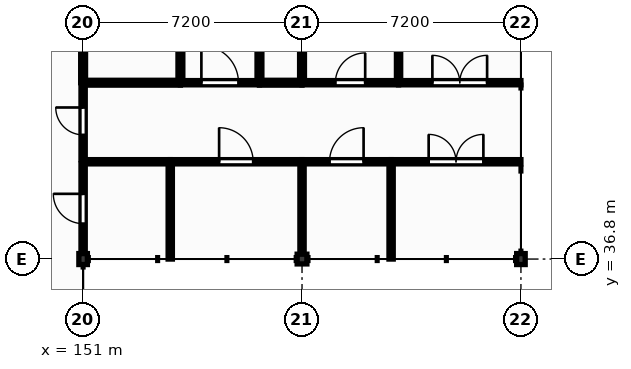
"""IFC4 building model, lengths in metres.
Left out: names, types, materials, properties, quantities, classifications, styles, units other than length and angle.
Written with IfcOpenShell. Run it as: python <this file> out.ifc"""

import sys

from ifc_helpers import new_model, si_unit, direction, frame, frame_2d, origin, origin_2d, place, context, subcontext, project, spatial, rectangle, extrude, element, fill, save


model = new_model("IFC4")
c1 = context("Model", 3, precision=1e-05, world=origin(), true_north=direction((0.0, 1.0)))
c2 = subcontext(c1, "Body", "Model", "MODEL_VIEW")
j1 = project(units=[si_unit("LENGTHUNIT", "METRE"), si_unit("PLANEANGLEUNIT", "RADIAN")], contexts=[c1])
p1 = place(None, origin())
s1 = spatial("IfcSite", under=j1, at=p1, CompositionType="ELEMENT")
p2 = place(p1, origin())
s2 = spatial("IfcBuilding", under=s1, at=p2, CompositionType="ELEMENT")
p3 = place(p2, frame((0.0, 0.0, 9.0)))
s3 = spatial("IfcBuildingStorey", under=s2, at=p3, CompositionType="ELEMENT", Elevation=9.0)
p4 = place(p3, frame((151.0, 36.8, 0.0), z_axis=(0.0, 0.0, 1.0), x_axis=(1.0, 0.0, 0.0)))
e1 = element("IfcColumn", 1, at=p4, inside=s3, PredefinedType="COLUMN", context=c2, shape_type="SweptSolid", body=[
    extrude(rectangle(XDim=0.28, YDim=0.36, at=origin_2d()), origin(), (0.0, 0.0, 1.0), 5.775),
])
p5 = place(p3, frame((158.2, 36.8, 0.0), z_axis=(0.0, 0.0, 1.0), x_axis=(1.0, 0.0, 0.0)))
e2 = element("IfcColumn", 2, at=p5, inside=s3, PredefinedType="COLUMN", context=c2, shape_type="SweptSolid", body=[
    extrude(rectangle(XDim=0.32, YDim=0.32, at=origin_2d()), origin(), (0.0, 0.0, 1.0), 7.57),
])
p6 = place(p3, frame((165.4, 36.8, 0.0), z_axis=(0.0, 0.0, 1.0), x_axis=(1.0, 0.0, 0.0)))
e3 = element("IfcColumn", 3, at=p6, inside=s3, PredefinedType="COLUMN", context=c2, shape_type="SweptSolid", body=[
    extrude(rectangle(XDim=0.28, YDim=0.36, at=origin_2d()), origin(), (0.0, 0.0, 1.0), 9.365),
])
p7 = place(p3, frame((151.0, 36.98, 0.0), z_axis=(0.0, 0.0, 1.0), x_axis=(0.0, 1.0, 0.0)))
e4 = element("IfcWall", 4, at=p7, inside=s3, PredefinedType="PARTITIONING", context=c2, shape_type="SweptSolid", body=[
    extrude(rectangle(XDim=2.95, YDim=0.14, at=frame_2d((1.475, 0.0))), origin(), (0.0, 0.0, 1.0), 3.78),
])
p8 = place(p7, frame((0.985, 0.0, 0.0)))
e5 = element("IfcOpeningElement", 5, at=p8, cuts=e4, PredefinedType="OPENING", context=c2, shape_type="SweptSolid", body=[
    extrude(rectangle(XDim=0.98, YDim=2.15, at=frame_2d((0.49, 1.075))), frame((0.0, 0.08, 0.0), z_axis=(0.0, -1.0, 0.0), x_axis=(1.0, 0.0, 0.0)), (0.0, 0.0, 1.0), 0.16),
])
p9 = place(p3, frame((151.0, 40.07, 0.0), z_axis=(0.0, 0.0, 1.0), x_axis=(0.0, 1.0, 0.0)))
e6 = element("IfcWall", 6, at=p9, inside=s3, PredefinedType="PARTITIONING", context=c2, shape_type="SweptSolid", body=[
    extrude(rectangle(XDim=2.53, YDim=0.14, at=frame_2d((1.265, 0.0))), origin(), (0.0, 0.0, 1.0), 3.78),
])
p10 = place(p9, frame((0.815, 0.0, 0.0)))
e7 = element("IfcOpeningElement", 7, at=p10, cuts=e6, PredefinedType="OPENING", context=c2, shape_type="SweptSolid", body=[
    extrude(rectangle(XDim=0.9, YDim=2.1, at=frame_2d((0.45, 1.05))), frame((0.0, 0.08, 0.0), z_axis=(0.0, -1.0, 0.0), x_axis=(1.0, 0.0, 0.0)), (0.0, 0.0, 1.0), 0.16),
])
p11 = place(p3, frame((151.0, 40.0, 0.0), z_axis=(0.0, 0.0, 1.0), x_axis=(1.0, 0.0, 0.0)))
e8 = element("IfcWall", 8, at=p11, inside=s3, PredefinedType="PARTITIONING", context=c2, shape_type="SweptSolid", body=[
    extrude(rectangle(XDim=2.866, YDim=0.14, at=frame_2d((1.433, 0.0))), origin(), (0.0, 0.0, 1.0), 3.78),
])
p12 = place(p3, frame((153.866, 36.8, 0.0), z_axis=(0.0, 0.0, 1.0), x_axis=(0.0, 1.0, 0.0)))
e9 = element("IfcWall", 9, at=p12, inside=s3, PredefinedType="PARTITIONING", context=c2, shape_type="SweptSolid", body=[
    extrude(rectangle(XDim=3.13, YDim=0.14, at=frame_2d((1.565, 0.0))), origin(), (0.0, 0.0, 1.0), 3.78),
])
p13 = place(p3, frame((153.866, 40.0, 0.0), z_axis=(0.0, 0.0, 1.0), x_axis=(1.0, 0.0, 0.0)))
e10 = element("IfcWall", 10, at=p13, inside=s3, PredefinedType="PARTITIONING", context=c2, shape_type="SweptSolid", body=[
    extrude(rectangle(XDim=4.334, YDim=0.14, at=frame_2d((2.167, 0.0))), origin(), (0.0, 0.0, 1.0), 3.78),
])
p14 = place(p13, frame((1.607, 0.0, 0.0)))
e11 = element("IfcOpeningElement", 11, at=p14, cuts=e10, PredefinedType="OPENING", context=c2, shape_type="SweptSolid", body=[
    extrude(rectangle(XDim=1.12, YDim=2.15, at=frame_2d((0.56, 1.075))), frame((0.0, 0.08, 0.0), z_axis=(0.0, -1.0, 0.0), x_axis=(1.0, 0.0, 0.0)), (0.0, 0.0, 1.0), 0.16),
])
p15 = place(p3, frame((154.2, 42.6, 0.0), z_axis=(0.0, 0.0, 1.0), x_axis=(1.0, 0.0, 0.0)))
e12 = element("IfcWall", 12, at=p15, inside=s3, PredefinedType="PARTITIONING", context=c2, shape_type="SweptSolid", body=[
    extrude(rectangle(XDim=2.6, YDim=0.14, at=frame_2d((1.3, 0.0))), origin(), (0.0, 0.0, 1.0), 3.78),
])
p16 = place(p15, frame((0.69, 0.0, 0.0)))
e13 = element("IfcOpeningElement", 13, at=p16, cuts=e12, PredefinedType="OPENING", context=c2, shape_type="SweptSolid", body=[
    extrude(rectangle(XDim=1.22, YDim=2.1, at=frame_2d((0.61, 1.05))), frame((0.0, 0.08, 0.0), z_axis=(0.0, -1.0, 0.0), x_axis=(1.0, 0.0, 0.0)), (0.0, 0.0, 1.0), 0.16),
])
p17 = place(p3, frame((158.2, 36.96, 0.0), z_axis=(0.0, 0.0, 1.0), x_axis=(0.0, 1.0, 0.0)))
e14 = element("IfcWall", 14, at=p17, inside=s3, PredefinedType="PARTITIONING", context=c2, shape_type="SweptSolid", body=[
    extrude(rectangle(XDim=2.97, YDim=0.14, at=frame_2d((1.485, 0.0))), origin(), (0.0, 0.0, 1.0), 3.78),
])
p18 = place(p3, frame((158.2, 40.0, 0.0), z_axis=(0.0, 0.0, 1.0), x_axis=(1.0, 0.0, 0.0)))
e15 = element("IfcWall", 15, at=p18, inside=s3, PredefinedType="PARTITIONING", context=c2, shape_type="SweptSolid", body=[
    extrude(rectangle(XDim=2.93, YDim=0.14, at=frame_2d((1.465, 0.0))), origin(), (0.0, 0.0, 1.0), 3.78),
])
p19 = place(p18, frame((0.905, 0.0, 0.0)))
e16 = element("IfcOpeningElement", 16, at=p19, cuts=e15, PredefinedType="OPENING", context=c2, shape_type="SweptSolid", body=[
    extrude(rectangle(XDim=1.12, YDim=2.15, at=frame_2d((0.56, 1.075))), frame((0.0, 0.08, 0.0), z_axis=(0.0, -1.0, 0.0), x_axis=(1.0, 0.0, 0.0)), (0.0, 0.0, 1.0), 0.16),
])
p20 = place(p3, frame((158.2, 42.6, 0.0), z_axis=(0.0, 0.0, 1.0), x_axis=(1.0, 0.0, 0.0)))
e17 = element("IfcWall", 17, at=p20, inside=s3, PredefinedType="PARTITIONING", context=c2, shape_type="SweptSolid", body=[
    extrude(rectangle(XDim=3.175, YDim=0.14, at=frame_2d((1.587, 0.0))), origin(), (0.0, 0.0, 1.0), 3.78),
])
p21 = place(p20, frame((1.097, 0.0, 0.0)))
e18 = element("IfcOpeningElement", 18, at=p21, cuts=e17, PredefinedType="OPENING", context=c2, shape_type="SweptSolid", body=[
    extrude(rectangle(XDim=0.98, YDim=2.15, at=frame_2d((0.49, 1.075))), frame((0.0, 0.08, 0.0), z_axis=(0.0, -1.0, 0.0), x_axis=(1.0, 0.0, 0.0)), (0.0, 0.0, 1.0), 0.16),
])
p22 = place(p3, frame((161.13, 36.8, 0.0), z_axis=(0.0, 0.0, 1.0), x_axis=(0.0, 1.0, 0.0)))
e19 = element("IfcWall", 19, at=p22, inside=s3, PredefinedType="PARTITIONING", context=c2, shape_type="SweptSolid", body=[
    extrude(rectangle(XDim=3.13, YDim=0.14, at=frame_2d((1.565, 0.0))), origin(), (0.0, 0.0, 1.0), 3.78),
])
p23 = place(p3, frame((161.13, 40.0, 0.0), z_axis=(0.0, 0.0, 1.0), x_axis=(1.0, 0.0, 0.0)))
e20 = element("IfcWall", 20, at=p23, inside=s3, PredefinedType="PARTITIONING", context=c2, shape_type="SweptSolid", body=[
    extrude(rectangle(XDim=4.27, YDim=0.14, at=frame_2d((2.135, 0.0))), origin(), (0.0, 0.0, 1.0), 3.78),
])
p24 = place(p23, frame((1.235, 0.0, 0.0)))
e21 = element("IfcOpeningElement", 21, at=p24, cuts=e20, PredefinedType="OPENING", context=c2, shape_type="SweptSolid", body=[
    extrude(rectangle(XDim=1.8, YDim=2.3, at=frame_2d((0.9, 1.15))), frame((0.0, 0.08, 0.0), z_axis=(0.0, -1.0, 0.0), x_axis=(1.0, 0.0, 0.0)), (0.0, 0.0, 1.0), 0.16),
])
p25 = place(p3, frame((161.375, 42.67, 0.0), z_axis=(0.0, 0.0, 1.0), x_axis=(0.0, 1.0, 0.0)))
e22 = element("IfcWall", 22, at=p25, inside=s3, PredefinedType="PARTITIONING", context=c2, shape_type="SweptSolid", body=[
    extrude(rectangle(XDim=2.73, YDim=0.14, at=frame_2d((1.365, 0.0))), origin(), (0.0, 0.0, 1.0), 3.78),
])
p26 = place(p3, frame((161.375, 42.6, 0.0), z_axis=(0.0, 0.0, 1.0), x_axis=(1.0, 0.0, 0.0)))
e23 = element("IfcWall", 23, at=p26, inside=s3, PredefinedType="PARTITIONING", context=c2, shape_type="SweptSolid", body=[
    extrude(rectangle(XDim=4.025, YDim=0.14, at=frame_2d((2.012, 0.0))), origin(), (0.0, 0.0, 1.0), 3.78),
])
p27 = place(p26, frame((1.113, 0.0, 0.0)))
e24 = element("IfcOpeningElement", 24, at=p27, cuts=e23, PredefinedType="OPENING", context=c2, shape_type="SweptSolid", body=[
    extrude(rectangle(XDim=1.8, YDim=2.3, at=frame_2d((0.9, 1.15))), frame((0.0, 0.08, 0.0), z_axis=(0.0, -1.0, 0.0), x_axis=(1.0, 0.0, 0.0)), (0.0, 0.0, 1.0), 0.16),
])
p28 = place(p3, frame((151.0, 42.6, 0.0), z_axis=(0.0, 0.0, 1.0), x_axis=(0.0, 1.0, 0.0)))
e25 = element("IfcWall", 25, at=p28, inside=s3, PredefinedType="PARTITIONING", context=c2, shape_type="SweptSolid", body=[
    extrude(rectangle(XDim=2.64, YDim=0.16, at=frame_2d((1.32, 0.0))), origin(), (0.0, 0.0, 1.0), 3.78),
])
p29 = place(p3, frame((158.2, 42.6, 0.0), z_axis=(0.0, 0.0, 1.0), x_axis=(-1.0, 0.0, 0.0)))
e26 = element("IfcWall", 26, at=p29, inside=s3, PredefinedType="PARTITIONING", context=c2, shape_type="SweptSolid", body=[
    extrude(rectangle(XDim=1.4, YDim=0.16, at=frame_2d((0.7, 0.0))), origin(), (0.0, 0.0, 1.0), 3.78),
])
p30 = place(p3, frame((154.2, 42.6, 0.0), z_axis=(0.0, 0.0, 1.0), x_axis=(-1.0, 0.0, 0.0)))
e27 = element("IfcWall", 27, at=p30, inside=s3, PredefinedType="PARTITIONING", context=c2, shape_type="SweptSolid", body=[
    extrude(rectangle(XDim=3.2, YDim=0.16, at=frame_2d((1.6, 0.0))), origin(), (0.0, 0.0, 1.0), 3.78),
])
p31 = place(p3, frame((156.8, 42.67, 0.0), z_axis=(0.0, 0.0, 1.0), x_axis=(0.0, 1.0, 0.0)))
e28 = element("IfcWall", 28, at=p31, inside=s3, PredefinedType="PARTITIONING", context=c2, shape_type="SweptSolid", body=[
    extrude(rectangle(XDim=3.53, YDim=0.16, at=frame_2d((1.765, 0.0))), origin(), (0.0, 0.0, 1.0), 3.78),
])
p32 = place(p3, frame((154.2, 42.67, 0.0), z_axis=(0.0, 0.0, 1.0), x_axis=(0.0, 1.0, 0.0)))
e29 = element("IfcWall", 29, at=p32, inside=s3, PredefinedType="PARTITIONING", context=c2, shape_type="SweptSolid", body=[
    extrude(rectangle(XDim=5.99, YDim=0.16, at=frame_2d((2.995, 0.0))), origin(), (0.0, 0.0, 1.0), 3.78),
])
p33 = place(p3, frame((158.2, 42.67, 0.0), z_axis=(0.0, 0.0, 1.0), x_axis=(0.0, 1.0, 0.0)))
e30 = element("IfcWall", 30, at=p33, inside=s3, PredefinedType="PARTITIONING", context=c2, shape_type="SweptSolid", body=[
    extrude(rectangle(XDim=2.55, YDim=0.16, at=frame_2d((1.275, 0.0))), origin(), (0.0, 0.0, 1.0), 3.78),
])
p34 = place(p10, origin())
e31 = element("IfcDoor", 31, at=p34, inside=s3, OperationType="SINGLE_SWING_RIGHT", PredefinedType="DOOR", context=c2, shape_type="SweptSolid", body=[
    extrude(rectangle(XDim=0.9, YDim=2.1, at=frame_2d((0.45, 1.05))), frame((0.0, 0.025, 0.0), z_axis=(0.0, -1.0, 0.0), x_axis=(1.0, 0.0, 0.0)), (0.0, 0.0, 1.0), 0.05),
])
fill(e7, e31)
p35 = place(p16, origin())
e32 = element("IfcDoor", 32, at=p35, inside=s3, OperationType="SINGLE_SWING_LEFT", PredefinedType="DOOR", context=c2, shape_type="SweptSolid", body=[
    extrude(rectangle(XDim=1.22, YDim=2.1, at=frame_2d((0.61, 1.05))), frame((0.0, 0.025, 0.0), z_axis=(0.0, -1.0, 0.0), x_axis=(1.0, 0.0, 0.0)), (0.0, 0.0, 1.0), 0.05),
])
fill(e13, e32)
p36 = place(p8, origin())
e33 = element("IfcDoor", 33, at=p36, inside=s3, OperationType="SINGLE_SWING_RIGHT", PredefinedType="DOOR", context=c2, shape_type="SweptSolid", body=[
    extrude(rectangle(XDim=0.98, YDim=2.15, at=frame_2d((0.49, 1.075))), frame((0.0, 0.025, 0.0), z_axis=(0.0, -1.0, 0.0), x_axis=(1.0, 0.0, 0.0)), (0.0, 0.0, 1.0), 0.05),
])
fill(e5, e33)
p37 = place(p14, origin())
e34 = element("IfcDoor", 34, at=p37, inside=s3, OperationType="SINGLE_SWING_LEFT", PredefinedType="DOOR", context=c2, shape_type="SweptSolid", body=[
    extrude(rectangle(XDim=1.12, YDim=2.15, at=frame_2d((0.56, 1.075))), frame((0.0, 0.025, 0.0), z_axis=(0.0, -1.0, 0.0), x_axis=(1.0, 0.0, 0.0)), (0.0, 0.0, 1.0), 0.05),
])
fill(e11, e34)
p38 = place(p19, origin())
e35 = element("IfcDoor", 35, at=p38, inside=s3, OperationType="SINGLE_SWING_RIGHT", PredefinedType="DOOR", context=c2, shape_type="SweptSolid", body=[
    extrude(rectangle(XDim=1.12, YDim=2.15, at=frame_2d((0.56, 1.075))), frame((0.0, 0.025, 0.0), z_axis=(0.0, -1.0, 0.0), x_axis=(1.0, 0.0, 0.0)), (0.0, 0.0, 1.0), 0.05),
])
fill(e16, e35)
p39 = place(p24, origin())
e36 = element("IfcDoor", 36, at=p39, inside=s3, OperationType="DOUBLE_DOOR_SINGLE_SWING", PredefinedType="DOOR", context=c2, shape_type="SweptSolid", body=[
    extrude(rectangle(XDim=1.8, YDim=2.3, at=frame_2d((0.9, 1.15))), frame((0.0, 0.025, 0.0), z_axis=(0.0, -1.0, 0.0), x_axis=(1.0, 0.0, 0.0)), (0.0, 0.0, 1.0), 0.05),
])
fill(e21, e36)
p40 = place(p21, origin())
e37 = element("IfcDoor", 37, at=p40, inside=s3, OperationType="SINGLE_SWING_RIGHT", PredefinedType="DOOR", context=c2, shape_type="SweptSolid", body=[
    extrude(rectangle(XDim=0.98, YDim=2.15, at=frame_2d((0.49, 1.075))), frame((0.0, 0.025, 0.0), z_axis=(0.0, -1.0, 0.0), x_axis=(1.0, 0.0, 0.0)), (0.0, 0.0, 1.0), 0.05),
])
fill(e18, e37)
p41 = place(p27, origin())
e38 = element("IfcDoor", 38, at=p41, inside=s3, OperationType="DOUBLE_DOOR_SINGLE_SWING", PredefinedType="DOOR", context=c2, shape_type="SweptSolid", body=[
    extrude(rectangle(XDim=1.8, YDim=2.3, at=frame_2d((0.9, 1.15))), frame((0.0, 0.025, 0.0), z_axis=(0.0, -1.0, 0.0), x_axis=(1.0, 0.0, 0.0)), (0.0, 0.0, 1.0), 0.05),
])
fill(e24, e38)
save(model, sys.argv[1])
